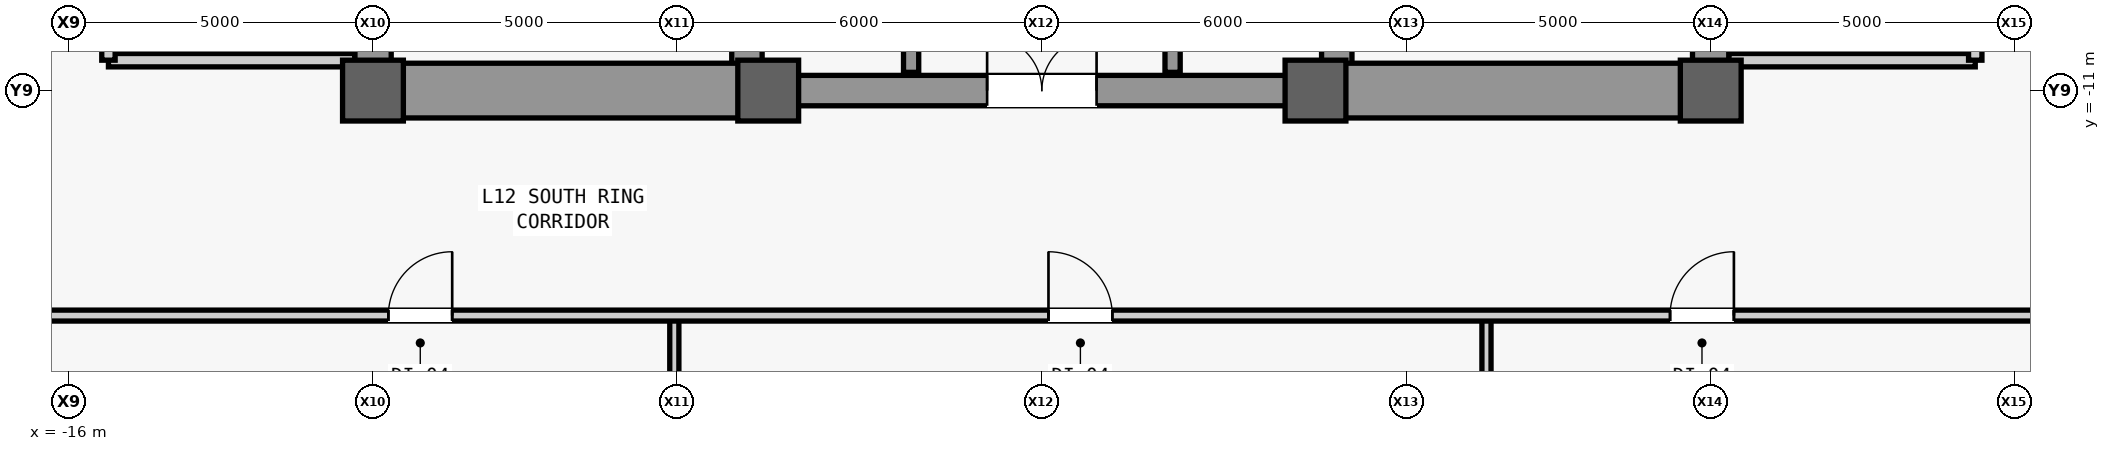
"""IFC4 building model, lengths in metres.
Left out: names, types, materials, properties, quantities, classifications, styles, units other than length and angle.
Written with IfcOpenShell. Run it as: python <this file> out.ifc"""

import sys

from ifc_helpers import new_model, si_unit, direction, frame, frame_2d, origin, origin_2d, place, context, subcontext, project, spatial, rectangle, extrude, source, transform, mapped, element, fill, save


model = new_model("IFC4")
c1 = context("Model", 3, precision=1e-05, world=origin(), true_north=direction((0.0, 1.0)))
c2 = subcontext(c1, "Body", "Model", "MODEL_VIEW")
j1 = project(units=[si_unit("LENGTHUNIT", "METRE"), si_unit("PLANEANGLEUNIT", "RADIAN")], contexts=[c1])
p1 = place(None, origin())
s1 = spatial("IfcSite", under=j1, at=p1, CompositionType="ELEMENT")
p2 = place(p1, origin())
s2 = spatial("IfcBuilding", under=s1, at=p2, CompositionType="ELEMENT")
p3 = place(p2, frame((0.0, 0.0, 57.8)))
s3 = spatial("IfcBuildingStorey", under=s2, at=p3, CompositionType="ELEMENT", Elevation=57.8)
m1 = source(origin(), c2, "Body", "SweptSolid", [
    extrude(rectangle(XDim=22.0, YDim=0.6, at=frame_2d((11.0, 0.0))), origin(), (0.0, 0.0, 1.0), 3.94),
])
p4 = place(p3, frame((-11.0, -11.0, 0.0), z_axis=(0.0, 0.0, 1.0), x_axis=(0.0, 1.0, 0.0)))
e1 = element("IfcWall", 1, at=p4, inside=s3, PredefinedType="SHEAR", context=c2, shape_type="MappedRepresentation", body=[
    mapped(m1, transform((0.0, 0.0, 0.0), scale=1.0)),
])
m2 = source(origin(), c2, "Body", "SweptSolid", [
    extrude(rectangle(XDim=1.1, YDim=2.2, at=frame_2d((0.55, 1.1))), frame((0.0, 0.31, 0.0), z_axis=(0.0, -1.0, 0.0), x_axis=(1.0, 0.0, 0.0)), (0.0, 0.0, 1.0), 0.62),
])
p5 = place(p4, frame((0.8, 0.0, 0.0)))
e2 = element("IfcOpeningElement", 2, at=p5, cuts=e1, PredefinedType="OPENING", context=c2, shape_type="MappedRepresentation", body=[
    mapped(m2, transform((0.0, 0.0, 0.0), scale=1.0)),
])
p6 = place(p4, frame((12.5, 0.0, 0.0)))
e3 = element("IfcOpeningElement", 3, at=p6, cuts=e1, PredefinedType="OPENING", context=c2, shape_type="MappedRepresentation", body=[
    mapped(m2, transform((0.0, 0.0, 0.0), scale=1.0)),
])
m3 = source(origin(), c2, "Body", "SweptSolid", [
    extrude(rectangle(XDim=0.9, YDim=2.15, at=frame_2d((0.45, 1.075))), frame((0.0, 0.31, 0.0), z_axis=(0.0, -1.0, 0.0), x_axis=(1.0, 0.0, 0.0)), (0.0, 0.0, 1.0), 0.62),
])
p7 = place(p4, frame((6.2, 0.0, 0.0)))
e4 = element("IfcOpeningElement", 4, at=p7, cuts=e1, PredefinedType="OPENING", context=c2, shape_type="MappedRepresentation", body=[
    mapped(m3, transform((0.0, 0.0, 0.0), scale=1.0)),
])
p8 = place(p4, frame((8.525, 0.0, 0.0)))
e5 = element("IfcOpeningElement", 5, at=p8, cuts=e1, PredefinedType="OPENING", context=c2, shape_type="MappedRepresentation", body=[
    mapped(m3, transform((0.0, 0.0, 0.0), scale=1.0)),
])
m4 = source(origin(), c2, "Body", "SweptSolid", [
    extrude(rectangle(XDim=1.3, YDim=2.3, at=frame_2d((0.65, 1.15))), frame((0.0, 0.31, 0.0), z_axis=(0.0, -1.0, 0.0), x_axis=(1.0, 0.0, 0.0)), (0.0, 0.0, 1.0), 0.62),
])
p9 = place(p4, frame((2.7, 0.0, 0.0)))
e6 = element("IfcOpeningElement", 6, at=p9, cuts=e1, PredefinedType="OPENING", context=c2, shape_type="MappedRepresentation", body=[
    mapped(m4, transform((0.0, 0.0, 0.0), scale=1.0)),
])
p10 = place(p3, frame((11.0, -11.0, 0.0), z_axis=(0.0, 0.0, 1.0), x_axis=(0.0, 1.0, 0.0)))
e7 = element("IfcWall", 7, at=p10, inside=s3, PredefinedType="SHEAR", context=c2, shape_type="MappedRepresentation", body=[
    mapped(m1, transform((0.0, 0.0, 0.0), scale=1.0)),
])
p11 = place(p10, frame((0.8, 0.0, 0.0)))
e8 = element("IfcOpeningElement", 8, at=p11, cuts=e7, PredefinedType="OPENING", context=c2, shape_type="MappedRepresentation", body=[
    mapped(m2, transform((0.0, 0.0, 0.0), scale=1.0)),
])
p12 = place(p10, frame((6.2, 0.0, 0.0)))
e9 = element("IfcOpeningElement", 9, at=p12, cuts=e7, PredefinedType="OPENING", context=c2, shape_type="MappedRepresentation", body=[
    mapped(m3, transform((0.0, 0.0, 0.0), scale=1.0)),
])
p13 = place(p10, frame((8.525, 0.0, 0.0)))
e10 = element("IfcOpeningElement", 10, at=p13, cuts=e7, PredefinedType="OPENING", context=c2, shape_type="MappedRepresentation", body=[
    mapped(m3, transform((0.0, 0.0, 0.0), scale=1.0)),
])
p14 = place(p10, frame((2.7, 0.0, 0.0)))
e11 = element("IfcOpeningElement", 11, at=p14, cuts=e7, PredefinedType="OPENING", context=c2, shape_type="MappedRepresentation", body=[
    mapped(m4, transform((0.0, 0.0, 0.0), scale=1.0)),
])
p15 = place(p10, frame((13.35, 0.0, 0.0)))
e12 = element("IfcOpeningElement", 12, at=p15, cuts=e7, PredefinedType="OPENING", context=c2, shape_type="MappedRepresentation", body=[
    mapped(m4, transform((0.0, 0.0, 0.0), scale=1.0)),
])
m5 = source(origin(), c2, "Body", "SweptSolid", [
    extrude(rectangle(XDim=21.4, YDim=0.5, at=frame_2d((10.7, 0.0))), origin(), (0.0, 0.0, 1.0), 3.94),
])
for number, where, z_axis, x_axis in (
    (13, (-4.85, -10.7, 0.0), (0.0, 0.0, 1.0), (0.0, 1.0, 0.0)),
    (14, (4.85, -10.7, 0.0), (0.0, 0.0, 1.0), (0.0, 1.0, 0.0)),
):
    element("IfcWall", number, at=place(p3, frame(where, z_axis=z_axis, x_axis=x_axis)), inside=s3, PredefinedType="SHEAR", context=c2, shape_type="MappedRepresentation", body=[
        mapped(m5, transform((0.0, 0.0, 0.0), scale=1.0)),
    ])
m6 = source(origin(), c2, "Body", "SweptSolid", [
    extrude(rectangle(XDim=5.85, YDim=0.9, at=frame_2d((2.925, 0.0))), origin(), (0.0, 0.0, 1.0), 3.94),
])
for number, where, z_axis, x_axis in (
    (15, (-10.7, -11.0, 0.0), (0.0, 0.0, 1.0), (1.0, 0.0, 0.0)),
    (16, (4.85, -11.0, 0.0), (0.0, 0.0, 1.0), (1.0, 0.0, 0.0)),
):
    element("IfcWall", number, at=place(p3, frame(where, z_axis=z_axis, x_axis=x_axis)), inside=s3, PredefinedType="SHEAR", context=c2, shape_type="MappedRepresentation", body=[
        mapped(m6, transform((0.0, 0.0, 0.0), scale=1.0)),
    ])
m7 = source(origin(), c2, "Body", "SweptSolid", [
    extrude(rectangle(XDim=9.2, YDim=0.5, at=frame_2d((4.6, 0.0))), origin(), (0.0, 0.0, 1.0), 3.94),
])
p16 = place(p3, frame((-4.6, -11.0, 0.0), z_axis=(0.0, 0.0, 1.0), x_axis=(1.0, 0.0, 0.0)))
e17 = element("IfcWall", 17, at=p16, inside=s3, PredefinedType="SHEAR", context=c2, shape_type="MappedRepresentation", body=[
    mapped(m7, transform((0.0, 0.0, 0.0), scale=1.0)),
])
m8 = source(origin(), c2, "Body", "SweptSolid", [
    extrude(rectangle(XDim=1.8, YDim=2.25, at=frame_2d((0.9, 1.125))), frame((0.0, 0.26, 0.0), z_axis=(0.0, -1.0, 0.0), x_axis=(1.0, 0.0, 0.0)), (0.0, 0.0, 1.0), 0.52),
])
p17 = place(p16, frame((3.7, 0.0, 0.0)))
e18 = element("IfcOpeningElement", 18, at=p17, cuts=e17, PredefinedType="OPENING", context=c2, shape_type="MappedRepresentation", body=[
    mapped(m8, transform((0.0, 0.0, 0.0), scale=1.0)),
])
m9 = source(origin(), c2, "Body", "SweptSolid", [
    extrude(rectangle(XDim=1.0, YDim=1.0, at=origin_2d()), origin(), (0.0, 0.0, 1.0), 4.2),
])
for number, where, z_axis, x_axis in (
    (19, (-11.0, -11.0, 0.0), (0.0, 0.0, 1.0), (1.0, 0.0, 0.0)),
    (20, (-4.5, -11.0, 0.0), (0.0, 0.0, 1.0), (1.0, 0.0, 0.0)),
    (21, (4.5, -11.0, 0.0), (0.0, 0.0, 1.0), (1.0, 0.0, 0.0)),
    (22, (11.0, -11.0, 0.0), (0.0, 0.0, 1.0), (1.0, 0.0, 0.0)),
):
    element("IfcColumn", number, at=place(p3, frame(where, z_axis=z_axis, x_axis=x_axis)), inside=s3, PredefinedType="COLUMN", context=c2, shape_type="MappedRepresentation", body=[
        mapped(m9, transform((0.0, 0.0, 0.0), scale=1.0)),
    ])
m10 = source(origin(), c2, "Body", "SweptSolid", [
    extrude(rectangle(XDim=4.05, YDim=0.22, at=frame_2d((2.025, 0.0))), origin(), (0.0, 0.0, 1.0), 3.94),
])
p18 = place(p3, frame((-15.35, -10.5, 0.0), z_axis=(0.0, 0.0, 1.0), x_axis=(1.0, 0.0, 0.0)))
e23 = element("IfcWall", 23, at=p18, inside=s3, PredefinedType="PARTITIONING", context=c2, shape_type="MappedRepresentation", body=[
    mapped(m10, transform((0.0, 0.0, 0.0), scale=1.0)),
])
m11 = source(origin(), c2, "Body", "SweptSolid", [
    extrude(rectangle(XDim=4.4, YDim=0.22, at=frame_2d((2.2, 0.0))), origin(), (0.0, 0.0, 1.0), 3.94),
])
p19 = place(p3, frame((-15.35, -10.5, 0.0), z_axis=(0.0, 0.0, 1.0), x_axis=(0.0, 1.0, 0.0)))
e24 = element("IfcWall", 24, at=p19, inside=s3, PredefinedType="PARTITIONING", context=c2, shape_type="MappedRepresentation", body=[
    mapped(m11, transform((0.0, 0.0, 0.0), scale=1.0)),
])
m12 = source(origin(), c2, "Body", "SweptSolid", [
    extrude(rectangle(XDim=1.2, YDim=2.2, at=frame_2d((0.6, 1.1))), frame((0.0, 0.12, 0.0), z_axis=(0.0, -1.0, 0.0), x_axis=(1.0, 0.0, 0.0)), (0.0, 0.0, 1.0), 0.24),
])
p20 = place(p19, frame((1.6, 0.0, 0.0)))
e25 = element("IfcOpeningElement", 25, at=p20, cuts=e24, PredefinedType="OPENING", context=c2, shape_type="MappedRepresentation", body=[
    mapped(m12, transform((0.0, 0.0, 0.0), scale=1.0)),
])
p21 = place(p3, frame((11.3, -10.5, 0.0), z_axis=(0.0, 0.0, 1.0), x_axis=(1.0, 0.0, 0.0)))
e26 = element("IfcWall", 26, at=p21, inside=s3, PredefinedType="PARTITIONING", context=c2, shape_type="MappedRepresentation", body=[
    mapped(m10, transform((0.0, 0.0, 0.0), scale=1.0)),
])
p22 = place(p3, frame((15.35, -10.5, 0.0), z_axis=(0.0, 0.0, 1.0), x_axis=(0.0, 1.0, 0.0)))
e27 = element("IfcWall", 27, at=p22, inside=s3, PredefinedType="PARTITIONING", context=c2, shape_type="MappedRepresentation", body=[
    mapped(m11, transform((0.0, 0.0, 0.0), scale=1.0)),
])
p23 = place(p22, frame((1.6, 0.0, 0.0)))
e28 = element("IfcOpeningElement", 28, at=p23, cuts=e27, PredefinedType="OPENING", context=c2, shape_type="MappedRepresentation", body=[
    mapped(m12, transform((0.0, 0.0, 0.0), scale=1.0)),
])
m13 = source(origin(), c2, "Body", "SweptSolid", [
    extrude(rectangle(XDim=5.4, YDim=0.25, at=frame_2d((2.7, 0.0))), origin(), (0.0, 0.0, 1.0), 3.94),
])
p24 = place(p3, frame((-2.15, -10.7, 0.0), z_axis=(0.0, 0.0, 1.0), x_axis=(0.0, 1.0, 0.0)))
e29 = element("IfcWall", 29, at=p24, inside=s3, PredefinedType="SHEAR", context=c2, shape_type="MappedRepresentation", body=[
    mapped(m13, transform((0.0, 0.0, 0.0), scale=1.0)),
])
m14 = source(origin(), c2, "Body", "SweptSolid", [
    extrude(rectangle(XDim=1.2, YDim=2.3, at=frame_2d((0.6, 1.15))), frame((0.0, 0.135, 0.0), z_axis=(0.0, -1.0, 0.0), x_axis=(1.0, 0.0, 0.0)), (0.0, 0.0, 1.0), 0.27),
])
p25 = place(p24, frame((0.9, 0.0, 0.0)))
e30 = element("IfcOpeningElement", 30, at=p25, cuts=e29, PredefinedType="OPENING", context=c2, shape_type="MappedRepresentation", body=[
    mapped(m14, transform((0.0, 0.0, 0.0), scale=1.0)),
])
p26 = place(p24, frame((3.2, 0.0, 0.0)))
e31 = element("IfcOpeningElement", 31, at=p26, cuts=e29, PredefinedType="OPENING", context=c2, shape_type="MappedRepresentation", body=[
    mapped(m14, transform((0.0, 0.0, 0.0), scale=1.0)),
])
p27 = place(p3, frame((2.15, -10.7, 0.0), z_axis=(0.0, 0.0, 1.0), x_axis=(0.0, 1.0, 0.0)))
e32 = element("IfcWall", 32, at=p27, inside=s3, PredefinedType="SHEAR", context=c2, shape_type="MappedRepresentation", body=[
    mapped(m13, transform((0.0, 0.0, 0.0), scale=1.0)),
])
p28 = place(p27, frame((0.9, 0.0, 0.0)))
e33 = element("IfcOpeningElement", 33, at=p28, cuts=e32, PredefinedType="OPENING", context=c2, shape_type="MappedRepresentation", body=[
    mapped(m14, transform((0.0, 0.0, 0.0), scale=1.0)),
])
p29 = place(p27, frame((3.2, 0.0, 0.0)))
e34 = element("IfcOpeningElement", 34, at=p29, cuts=e32, PredefinedType="OPENING", context=c2, shape_type="MappedRepresentation", body=[
    mapped(m14, transform((0.0, 0.0, 0.0), scale=1.0)),
])
m15 = source(origin(), c2, "Body", "SweptSolid", [
    extrude(rectangle(XDim=17.3, YDim=0.15, at=frame_2d((8.65, 0.0))), origin(), (0.0, 0.0, 1.0), 3.085),
])
p30 = place(p3, frame((-6.044, -32.0, 0.0), z_axis=(0.0, 0.0, 1.0), x_axis=(0.0, 1.0, 0.0)))
e35 = element("IfcWall", 35, at=p30, inside=s3, PredefinedType="PARTITIONING", context=c2, shape_type="MappedRepresentation", body=[
    mapped(m15, transform((0.0, 0.0, 0.0), scale=1.0)),
])
m16 = source(origin(), c2, "Body", "SweptSolid", [
    extrude(rectangle(XDim=17.3, YDim=0.15, at=frame_2d((8.65, 0.0))), origin(), (0.0, 0.0, 1.0), 3.94),
])
p31 = place(p3, frame((7.312, -32.0, 0.0), z_axis=(0.0, 0.0, 1.0), x_axis=(0.0, 1.0, 0.0)))
e36 = element("IfcWall", 36, at=p31, inside=s3, PredefinedType="PARTITIONING", context=c2, shape_type="MappedRepresentation", body=[
    mapped(m16, transform((0.0, 0.0, 0.0), scale=1.0)),
])
m17 = source(origin(), c2, "Body", "SweptSolid", [
    extrude(rectangle(XDim=37.1, YDim=0.18, at=frame_2d((18.55, 0.0))), origin(), (0.0, 0.0, 1.0), 3.94),
])
p32 = place(p3, frame((-19.4, -14.7, 0.0), z_axis=(0.0, 0.0, 1.0), x_axis=(1.0, 0.0, 0.0)))
e37 = element("IfcWall", 37, at=p32, inside=s3, PredefinedType="PARTITIONING", context=c2, shape_type="MappedRepresentation", body=[
    mapped(m17, transform((0.0, 0.0, 0.0), scale=1.0)),
])
m18 = source(origin(), c2, "Body", "SweptSolid", [
    extrude(rectangle(XDim=1.05, YDim=2.2, at=frame_2d((0.525, 1.1))), frame((0.0, 0.1, 0.0), z_axis=(0.0, -1.0, 0.0), x_axis=(1.0, 0.0, 0.0)), (0.0, 0.0, 1.0), 0.2),
])
p33 = place(p32, frame((8.653, 0.0, 0.0)))
e38 = element("IfcOpeningElement", 38, at=p33, cuts=e37, PredefinedType="OPENING", context=c2, shape_type="MappedRepresentation", body=[
    mapped(m18, transform((0.0, 0.0, 0.0), scale=1.0)),
])
p34 = place(p32, frame((19.509, 0.0, 0.0)))
e39 = element("IfcOpeningElement", 39, at=p34, cuts=e37, PredefinedType="OPENING", context=c2, shape_type="MappedRepresentation", body=[
    mapped(m18, transform((0.0, 0.0, 0.0), scale=1.0)),
])
p35 = place(p32, frame((29.731, 0.0, 0.0)))
e40 = element("IfcOpeningElement", 40, at=p35, cuts=e37, PredefinedType="OPENING", context=c2, shape_type="MappedRepresentation", body=[
    mapped(m18, transform((0.0, 0.0, 0.0), scale=1.0)),
])
m19 = source(origin(), c2, "Body", "SweptSolid", [
    extrude(rectangle(XDim=1.8, YDim=2.25, at=frame_2d((0.9, 1.125))), frame((0.0, 0.025, 0.0), z_axis=(0.0, -1.0, 0.0), x_axis=(1.0, 0.0, 0.0)), (0.0, 0.0, 1.0), 0.05),
])
p36 = place(p17, origin())
e41 = element("IfcDoor", 41, at=p36, inside=s3, OperationType="SINGLE_SWING_LEFT", PredefinedType="DOOR", context=c2, shape_type="MappedRepresentation", body=[
    mapped(m19, transform((0.0, 0.0, 0.0), scale=1.0)),
])
fill(e18, e41)
m20 = source(origin(), c2, "Body", "SweptSolid", [
    extrude(rectangle(XDim=1.05, YDim=2.2, at=frame_2d((0.525, 1.1))), frame((0.0, 0.025, 0.0), z_axis=(0.0, -1.0, 0.0), x_axis=(1.0, 0.0, 0.0)), (0.0, 0.0, 1.0), 0.05),
])
p37 = place(p33, origin())
e42 = element("IfcDoor", 42, at=p37, inside=s3, OperationType="SINGLE_SWING_RIGHT", PredefinedType="DOOR", context=c2, shape_type="MappedRepresentation", body=[
    mapped(m20, transform((0.0, 0.0, 0.0), scale=1.0)),
])
fill(e38, e42)
p38 = place(p34, origin())
e43 = element("IfcDoor", 43, at=p38, inside=s3, OperationType="SINGLE_SWING_LEFT", PredefinedType="DOOR", context=c2, shape_type="MappedRepresentation", body=[
    mapped(m20, transform((0.0, 0.0, 0.0), scale=1.0)),
])
fill(e39, e43)
p39 = place(p35, origin())
e44 = element("IfcDoor", 44, at=p39, inside=s3, OperationType="SINGLE_SWING_RIGHT", PredefinedType="DOOR", context=c2, shape_type="MappedRepresentation", body=[
    mapped(m20, transform((0.0, 0.0, 0.0), scale=1.0)),
])
fill(e40, e44)
save(model, sys.argv[1])
